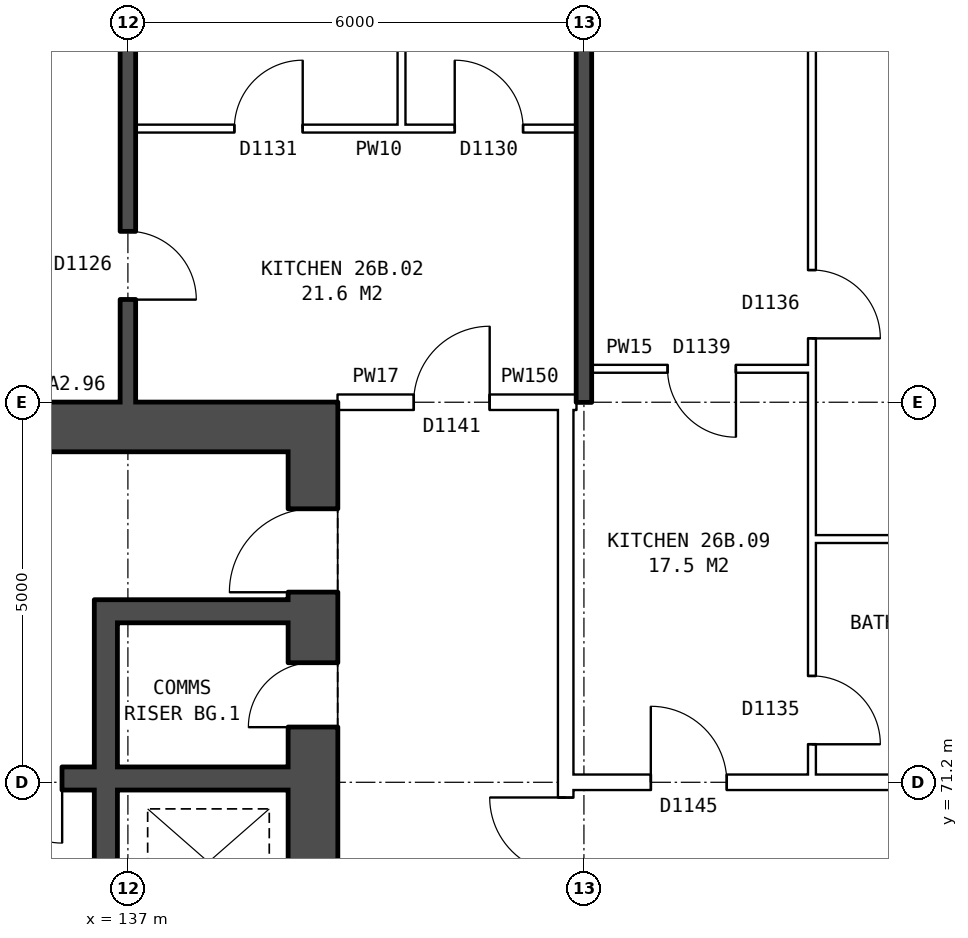
"""IFC4 building model, lengths in metres.
Left out: names, types, materials, properties, quantities, classifications, styles, units other than length and angle.
Written with IfcOpenShell. Run it as: python <this file> out.ifc"""

import sys

from ifc_helpers import new_model, si_unit, direction, frame, frame_2d, origin, place, context, subcontext, project, spatial, rectangle, extrude, element, fill, save


model = new_model("IFC4")
c1 = context("Model", 3, precision=1e-05, world=origin(), true_north=direction((0.0, 1.0)))
c2 = subcontext(c1, "Body", "Model", "MODEL_VIEW")
j1 = project(units=[si_unit("LENGTHUNIT", "METRE"), si_unit("PLANEANGLEUNIT", "RADIAN")], contexts=[c1])
p1 = place(None, origin())
s1 = spatial("IfcSite", under=j1, at=p1, CompositionType="ELEMENT")
p2 = place(p1, origin())
s2 = spatial("IfcBuilding", under=s1, at=p2, CompositionType="ELEMENT")
p3 = place(p2, frame((0.0, 0.0, 96.4)))
s3 = spatial("IfcBuildingStorey", under=s2, at=p3, CompositionType="ELEMENT", Elevation=96.4)
p4 = place(p3, frame((139.435, 64.45, 0.0), z_axis=(0.0, 0.0, 1.0), x_axis=(0.0, 1.0, 0.0)))
e1 = element("IfcWall", 1, at=p4, inside=s3, PredefinedType="SHEAR", context=c2, shape_type="SweptSolid", body=[
    extrude(rectangle(XDim=11.1, YDim=0.65, at=frame_2d((5.55, 0.0))), origin(), (0.0, 0.0, 1.0), 2.85),
])
p5 = place(p4, frame((0.675, 0.0, 0.0)))
e2 = element("IfcOpeningElement", 2, at=p5, cuts=e1, PredefinedType="OPENING", context=c2, shape_type="SweptSolid", body=[
    extrude(rectangle(XDim=1.1, YDim=2.1, at=frame_2d((0.55, 1.05))), frame((0.0, 0.335, 0.0), z_axis=(0.0, -1.0, 0.0), x_axis=(1.0, 0.0, 0.0)), (0.0, 0.0, 1.0), 0.67),
])
p6 = place(p4, frame((9.25, 0.0, 0.0)))
e3 = element("IfcOpeningElement", 3, at=p6, cuts=e1, PredefinedType="OPENING", context=c2, shape_type="SweptSolid", body=[
    extrude(rectangle(XDim=1.1, YDim=2.1, at=frame_2d((0.55, 1.05))), frame((0.0, 0.335, 0.0), z_axis=(0.0, -1.0, 0.0), x_axis=(1.0, 0.0, 0.0)), (0.0, 0.0, 1.0), 0.67),
])
p7 = place(p4, frame((7.475, 0.0, 0.0)))
e4 = element("IfcOpeningElement", 4, at=p7, cuts=e1, PredefinedType="OPENING", context=c2, shape_type="SweptSolid", body=[
    extrude(rectangle(XDim=0.85, YDim=2.1, at=frame_2d((0.425, 1.05))), frame((0.0, 0.335, 0.0), z_axis=(0.0, -1.0, 0.0), x_axis=(1.0, 0.0, 0.0)), (0.0, 0.0, 1.0), 0.67),
])
p8 = place(p3, frame((139.76, 75.875, 0.0), z_axis=(0.0, 0.0, 1.0), x_axis=(-1.0, 0.0, 0.0)))
e5 = element("IfcWall", 5, at=p8, inside=s3, PredefinedType="SHEAR", context=c2, shape_type="SweptSolid", body=[
    extrude(rectangle(XDim=8.4, YDim=0.65, at=frame_2d((4.2, 0.0))), origin(), (0.0, 0.0, 1.0), 2.85),
])
p9 = place(p3, frame((139.11, 71.25, 0.0), z_axis=(0.0, 0.0, 1.0), x_axis=(-1.0, 0.0, 0.0)))
e6 = element("IfcWall", 6, at=p9, inside=s3, PredefinedType="SHEAR", context=c2, shape_type="SweptSolid", body=[
    extrude(rectangle(XDim=7.1, YDim=0.3, at=frame_2d((3.55, 0.0))), origin(), (0.0, 0.0, 1.0), 2.85),
])
p10 = place(p9, frame((4.7, 0.0, 0.0)))
e7 = element("IfcOpeningElement", 7, at=p10, cuts=e6, PredefinedType="OPENING", context=c2, shape_type="SweptSolid", body=[
    extrude(rectangle(XDim=1.1, YDim=2.1, at=frame_2d((0.55, 1.05))), frame((0.0, 0.16, 0.0), z_axis=(0.0, -1.0, 0.0), x_axis=(1.0, 0.0, 0.0)), (0.0, 0.0, 1.0), 0.32),
])
p11 = place(p9, frame((2.975, 0.0, 0.0)))
e8 = element("IfcOpeningElement", 8, at=p11, cuts=e6, PredefinedType="OPENING", context=c2, shape_type="SweptSolid", body=[
    extrude(rectangle(XDim=0.85, YDim=2.1, at=frame_2d((0.425, 1.05))), frame((0.0, 0.16, 0.0), z_axis=(0.0, -1.0, 0.0), x_axis=(1.0, 0.0, 0.0)), (0.0, 0.0, 1.0), 0.32),
])
p12 = place(p3, frame((139.11, 73.45, 0.0), z_axis=(0.0, 0.0, 1.0), x_axis=(-1.0, 0.0, 0.0)))
e9 = element("IfcWall", 9, at=p12, inside=s3, PredefinedType="SHEAR", context=c2, shape_type="SweptSolid", body=[
    extrude(rectangle(XDim=2.25, YDim=0.3, at=frame_2d((1.125, 0.0))), origin(), (0.0, 0.0, 1.0), 2.85),
])
p13 = place(p3, frame((136.71, 67.0, 0.0), z_axis=(0.0, 0.0, 1.0), x_axis=(0.0, 1.0, 0.0)))
e10 = element("IfcWall", 10, at=p13, inside=s3, PredefinedType="SHEAR", context=c2, shape_type="SweptSolid", body=[
    extrude(rectangle(XDim=4.1, YDim=0.3, at=frame_2d((2.05, 0.0))), origin(), (0.0, 0.0, 1.0), 2.85),
])
p14 = place(p3, frame((136.71, 71.4, 0.0), z_axis=(0.0, 0.0, 1.0), x_axis=(0.0, 1.0, 0.0)))
e11 = element("IfcWall", 11, at=p14, inside=s3, PredefinedType="SHEAR", context=c2, shape_type="SweptSolid", body=[
    extrude(rectangle(XDim=2.2, YDim=0.3, at=frame_2d((1.1, 0.0))), origin(), (0.0, 0.0, 1.0), 2.85),
])
p15 = place(p3, frame((142.76, 63.9, 0.0), z_axis=(0.0, 0.0, 1.0), x_axis=(0.0, 1.0, 0.0)))
e12 = element("IfcWall", 12, at=p15, inside=s3, PredefinedType="PARTITIONING", context=c2, shape_type="SweptSolid", body=[
    extrude(rectangle(XDim=12.2, YDim=0.2, at=frame_2d((6.1, 0.0))), origin(), (0.0, 0.0, 1.0), 2.85),
])
p16 = place(p15, frame((5.1, 0.0, 0.0)))
e13 = element("IfcOpeningElement", 13, at=p16, cuts=e12, PredefinedType="OPENING", context=c2, shape_type="SweptSolid", body=[
    extrude(rectangle(XDim=2.0, YDim=2.1, at=frame_2d((1.0, 1.05))), frame((0.0, 0.11, 0.0), z_axis=(0.0, -1.0, 0.0), x_axis=(1.0, 0.0, 0.0)), (0.0, 0.0, 1.0), 0.22),
])
p17 = place(p3, frame((142.76, 71.2, 0.0), z_axis=(0.0, 0.0, 1.0), x_axis=(1.0, 0.0, 0.0)))
e14 = element("IfcWall", 14, at=p17, inside=s3, PredefinedType="PARTITIONING", context=c2, shape_type="SweptSolid", body=[
    extrude(rectangle(XDim=14.48, YDim=0.2, at=frame_2d((7.24, 0.0))), origin(), (0.0, 0.0, 1.0), 2.85),
])
p18 = place(p17, frame((1.12, 0.0, 0.0)))
e15 = element("IfcOpeningElement", 15, at=p18, cuts=e14, PredefinedType="OPENING", context=c2, shape_type="SweptSolid", body=[
    extrude(rectangle(XDim=1.0, YDim=2.1, at=frame_2d((0.5, 1.05))), frame((0.0, 0.11, 0.0), z_axis=(0.0, -1.0, 0.0), x_axis=(1.0, 0.0, 0.0)), (0.0, 0.0, 1.0), 0.22),
])
p19 = place(p17, frame((10.24, 0.0, 0.0)))
e16 = element("IfcOpeningElement", 16, at=p19, cuts=e14, PredefinedType="OPENING", context=c2, shape_type="SweptSolid", body=[
    extrude(rectangle(XDim=1.0, YDim=2.1, at=frame_2d((0.5, 1.05))), frame((0.0, 0.11, 0.0), z_axis=(0.0, -1.0, 0.0), x_axis=(1.0, 0.0, 0.0)), (0.0, 0.0, 1.0), 0.22),
])
p20 = place(p3, frame((146.0, 74.4, 0.0), z_axis=(0.0, 0.0, 1.0), x_axis=(1.0, 0.0, 0.0)))
e17 = element("IfcWall", 17, at=p20, inside=s3, PredefinedType="PARTITIONING", context=c2, shape_type="SweptSolid", body=[
    extrude(rectangle(XDim=6.0, YDim=0.1, at=frame_2d((3.0, 0.0))), origin(), (0.0, 0.0, 1.0), 2.85),
])
p21 = place(p3, frame((139.76, 76.2, 0.0), z_axis=(0.0, 0.0, 1.0), x_axis=(1.0, 0.0, 0.0)))
e18 = element("IfcWall", 18, at=p21, inside=s3, PredefinedType="PARTITIONING", context=c2, shape_type="SweptSolid", body=[
    extrude(rectangle(XDim=3.0, YDim=0.2, at=frame_2d((1.5, 0.0))), origin(), (0.0, 0.0, 1.0), 2.85),
])
p22 = place(p21, frame((1.0, 0.0, 0.0)))
e19 = element("IfcOpeningElement", 19, at=p22, cuts=e18, PredefinedType="OPENING", context=c2, shape_type="SweptSolid", body=[
    extrude(rectangle(XDim=1.0, YDim=2.1, at=frame_2d((0.5, 1.05))), frame((0.0, 0.11, 0.0), z_axis=(0.0, -1.0, 0.0), x_axis=(1.0, 0.0, 0.0)), (0.0, 0.0, 1.0), 0.22),
])
p23 = place(p3, frame((142.76, 76.2, 0.0), z_axis=(0.0, 0.0, 1.0), x_axis=(1.0, 0.0, 0.0)))
e20 = element("IfcWall", 20, at=p23, inside=s3, PredefinedType="PARTITIONING", context=c2, shape_type="SweptSolid", body=[
    extrude(rectangle(XDim=0.14, YDim=0.2, at=frame_2d((0.07, 0.0))), origin(), (0.0, 0.0, 1.0), 2.85),
])
p24 = place(p3, frame((143.1, 76.64, 0.0), z_axis=(0.0, 0.0, 1.0), x_axis=(1.0, 0.0, 0.0)))
e21 = element("IfcWall", 21, at=p24, inside=s3, PredefinedType="PARTITIONING", context=c2, shape_type="SweptSolid", body=[
    extrude(rectangle(XDim=2.9, YDim=0.1, at=frame_2d((1.45, 0.0))), origin(), (0.0, 0.0, 1.0), 2.85),
])
p25 = place(p24, frame((1.0, 0.0, 0.0)))
e22 = element("IfcOpeningElement", 22, at=p25, cuts=e21, PredefinedType="OPENING", context=c2, shape_type="SweptSolid", body=[
    extrude(rectangle(XDim=0.9, YDim=2.1, at=frame_2d((0.45, 1.05))), frame((0.0, 0.06, 0.0), z_axis=(0.0, -1.0, 0.0), x_axis=(1.0, 0.0, 0.0)), (0.0, 0.0, 1.0), 0.12),
])
p26 = place(p3, frame((137.1, 79.8, 0.0), z_axis=(0.0, 0.0, 1.0), x_axis=(1.0, 0.0, 0.0)))
e23 = element("IfcWall", 23, at=p26, inside=s3, PredefinedType="PARTITIONING", context=c2, shape_type="SweptSolid", body=[
    extrude(rectangle(XDim=5.8, YDim=0.1, at=frame_2d((2.9, 0.0))), origin(), (0.0, 0.0, 1.0), 2.85),
])
p27 = place(p26, frame((1.3, 0.0, 0.0)))
e24 = element("IfcOpeningElement", 24, at=p27, cuts=e23, PredefinedType="OPENING", context=c2, shape_type="SweptSolid", body=[
    extrude(rectangle(XDim=0.9, YDim=2.1, at=frame_2d((0.45, 1.05))), frame((0.0, 0.06, 0.0), z_axis=(0.0, -1.0, 0.0), x_axis=(1.0, 0.0, 0.0)), (0.0, 0.0, 1.0), 0.12),
])
p28 = place(p26, frame((4.2, 0.0, 0.0)))
e25 = element("IfcOpeningElement", 25, at=p28, cuts=e23, PredefinedType="OPENING", context=c2, shape_type="SweptSolid", body=[
    extrude(rectangle(XDim=0.9, YDim=2.1, at=frame_2d((0.45, 1.05))), frame((0.0, 0.06, 0.0), z_axis=(0.0, -1.0, 0.0), x_axis=(1.0, 0.0, 0.0)), (0.0, 0.0, 1.0), 0.12),
])
p29 = place(p3, frame((137.0, 76.2, 0.0), z_axis=(0.0, 0.0, 1.0), x_axis=(0.0, 1.0, 0.0)))
e26 = element("IfcWall", 26, at=p29, inside=s3, PredefinedType="SOLIDWALL", context=c2, shape_type="SweptSolid", body=[
    extrude(rectangle(XDim=9.44, YDim=0.2, at=frame_2d((4.72, 0.0))), origin(), (0.0, 0.0, 1.0), 2.85),
])
p30 = place(p29, frame((1.35, 0.0, 0.0)))
e27 = element("IfcOpeningElement", 27, at=p30, cuts=e26, PredefinedType="OPENING", context=c2, shape_type="SweptSolid", body=[
    extrude(rectangle(XDim=0.9, YDim=2.1, at=frame_2d((0.45, 1.05))), frame((0.0, 0.11, 0.0), z_axis=(0.0, -1.0, 0.0), x_axis=(1.0, 0.0, 0.0)), (0.0, 0.0, 1.0), 0.22),
])
p31 = place(p3, frame((140.6, 79.85, 0.0), z_axis=(0.0, 0.0, 1.0), x_axis=(0.0, 1.0, 0.0)))
e28 = element("IfcWall", 28, at=p31, inside=s3, PredefinedType="PARTITIONING", context=c2, shape_type="SweptSolid", body=[
    extrude(rectangle(XDim=2.3, YDim=0.1, at=frame_2d((1.15, 0.0))), origin(), (0.0, 0.0, 1.0), 2.85),
])
p32 = place(p3, frame((143.0, 76.2, 0.0), z_axis=(0.0, 0.0, 1.0), x_axis=(0.0, 1.0, 0.0)))
e29 = element("IfcWall", 29, at=p32, inside=s3, PredefinedType="SOLIDWALL", context=c2, shape_type="SweptSolid", body=[
    extrude(rectangle(XDim=9.44, YDim=0.2, at=frame_2d((4.72, 0.0))), origin(), (0.0, 0.0, 1.0), 2.85),
])
p33 = place(p3, frame((146.0, 71.3, 0.0), z_axis=(0.0, 0.0, 1.0), x_axis=(0.0, 1.0, 0.0)))
e30 = element("IfcWall", 30, at=p33, inside=s3, PredefinedType="PARTITIONING", context=c2, shape_type="SweptSolid", body=[
    extrude(rectangle(XDim=14.34, YDim=0.1, at=frame_2d((7.17, 0.0))), origin(), (0.0, 0.0, 1.0), 2.85),
])
p34 = place(p33, frame((5.74, 0.0, 0.0)))
e31 = element("IfcOpeningElement", 31, at=p34, cuts=e30, PredefinedType="OPENING", context=c2, shape_type="SweptSolid", body=[
    extrude(rectangle(XDim=0.9, YDim=2.1, at=frame_2d((0.45, 1.05))), frame((0.0, 0.06, 0.0), z_axis=(0.0, -1.0, 0.0), x_axis=(1.0, 0.0, 0.0)), (0.0, 0.0, 1.0), 0.12),
])
p35 = place(p33, frame((0.4, 0.0, 0.0)))
e32 = element("IfcOpeningElement", 32, at=p35, cuts=e30, PredefinedType="OPENING", context=c2, shape_type="SweptSolid", body=[
    extrude(rectangle(XDim=0.9, YDim=2.1, at=frame_2d((0.45, 1.05))), frame((0.0, 0.06, 0.0), z_axis=(0.0, -1.0, 0.0), x_axis=(1.0, 0.0, 0.0)), (0.0, 0.0, 1.0), 0.12),
])
p36 = place(p6, origin())
e33 = element("IfcDoor", 33, at=p36, inside=s3, OperationType="SINGLE_SWING_LEFT", PredefinedType="DOOR", context=c2, shape_type="SweptSolid", body=[
    extrude(rectangle(XDim=1.1, YDim=2.1, at=frame_2d((0.55, 1.05))), frame((0.0, 0.31, 0.0), z_axis=(0.0, -1.0, 0.0), x_axis=(1.0, 0.0, 0.0)), (0.0, 0.0, 1.0), 0.05),
])
fill(e3, e33)
p37 = place(p7, origin())
e34 = element("IfcDoor", 34, at=p37, inside=s3, OperationType="SINGLE_SWING_LEFT", PredefinedType="DOOR", context=c2, shape_type="SweptSolid", body=[
    extrude(rectangle(XDim=0.85, YDim=2.1, at=frame_2d((0.425, 1.05))), frame((0.0, 0.31, 0.0), z_axis=(0.0, -1.0, 0.0), x_axis=(1.0, 0.0, 0.0)), (0.0, 0.0, 1.0), 0.05),
])
fill(e4, e34)
p38 = place(p11, origin())
e35 = element("IfcDoor", 35, at=p38, inside=s3, OperationType="SINGLE_SWING_LEFT", PredefinedType="DOOR", context=c2, shape_type="SweptSolid", body=[
    extrude(rectangle(XDim=0.85, YDim=2.1, at=frame_2d((0.425, 1.05))), frame((0.0, 0.025, 0.0), z_axis=(0.0, -1.0, 0.0), x_axis=(1.0, 0.0, 0.0)), (0.0, 0.0, 1.0), 0.05),
])
fill(e8, e35)
p39 = place(p16, origin())
e36 = element("IfcDoor", 36, at=p39, inside=s3, OperationType="DOUBLE_DOOR_SINGLE_SWING", PredefinedType="DOOR", context=c2, shape_type="SweptSolid", body=[
    extrude(rectangle(XDim=2.0, YDim=2.1, at=frame_2d((1.0, 1.05))), frame((0.0, 0.025, 0.0), z_axis=(0.0, -1.0, 0.0), x_axis=(1.0, 0.0, 0.0)), (0.0, 0.0, 1.0), 0.05),
])
fill(e13, e36)
p40 = place(p27, origin())
e37 = element("IfcDoor", 37, at=p40, inside=s3, OperationType="SINGLE_SWING_RIGHT", PredefinedType="DOOR", context=c2, shape_type="SweptSolid", body=[
    extrude(rectangle(XDim=0.9, YDim=2.1, at=frame_2d((0.45, 1.05))), frame((0.0, 0.025, 0.0), z_axis=(0.0, -1.0, 0.0), x_axis=(1.0, 0.0, 0.0)), (0.0, 0.0, 1.0), 0.05),
])
fill(e24, e37)
p41 = place(p22, origin())
e38 = element("IfcDoor", 38, at=p41, inside=s3, OperationType="SINGLE_SWING_RIGHT", PredefinedType="DOOR", context=c2, shape_type="SweptSolid", body=[
    extrude(rectangle(XDim=1.0, YDim=2.1, at=frame_2d((0.5, 1.05))), frame((0.0, 0.025, 0.0), z_axis=(0.0, -1.0, 0.0), x_axis=(1.0, 0.0, 0.0)), (0.0, 0.0, 1.0), 0.05),
])
fill(e19, e38)
p42 = place(p30, frame((0.9, 0.0, 0.0), z_axis=(0.0, 0.0, 1.0), x_axis=(-1.0, 0.0, 0.0)))
e39 = element("IfcDoor", 39, at=p42, inside=s3, OperationType="SINGLE_SWING_RIGHT", PredefinedType="DOOR", context=c2, shape_type="SweptSolid", body=[
    extrude(rectangle(XDim=0.9, YDim=2.1, at=frame_2d((0.45, 1.05))), frame((0.0, 0.025, 0.0), z_axis=(0.0, -1.0, 0.0), x_axis=(1.0, 0.0, 0.0)), (0.0, 0.0, 1.0), 0.05),
])
fill(e27, e39)
p43 = place(p28, origin())
e40 = element("IfcDoor", 40, at=p43, inside=s3, OperationType="SINGLE_SWING_LEFT", PredefinedType="DOOR", context=c2, shape_type="SweptSolid", body=[
    extrude(rectangle(XDim=0.9, YDim=2.1, at=frame_2d((0.45, 1.05))), frame((0.0, 0.025, 0.0), z_axis=(0.0, -1.0, 0.0), x_axis=(1.0, 0.0, 0.0)), (0.0, 0.0, 1.0), 0.05),
])
fill(e25, e40)
p44 = place(p34, frame((0.9, 0.0, 0.0), z_axis=(0.0, 0.0, 1.0), x_axis=(-1.0, 0.0, 0.0)))
e41 = element("IfcDoor", 41, at=p44, inside=s3, OperationType="SINGLE_SWING_RIGHT", PredefinedType="DOOR", context=c2, shape_type="SweptSolid", body=[
    extrude(rectangle(XDim=0.9, YDim=2.1, at=frame_2d((0.45, 1.05))), frame((0.0, 0.025, 0.0), z_axis=(0.0, -1.0, 0.0), x_axis=(1.0, 0.0, 0.0)), (0.0, 0.0, 1.0), 0.05),
])
fill(e31, e41)
p45 = place(p18, origin())
e42 = element("IfcDoor", 42, at=p45, inside=s3, OperationType="SINGLE_SWING_LEFT", PredefinedType="DOOR", context=c2, shape_type="SweptSolid", body=[
    extrude(rectangle(XDim=1.0, YDim=2.1, at=frame_2d((0.5, 1.05))), frame((0.0, 0.025, 0.0), z_axis=(0.0, -1.0, 0.0), x_axis=(1.0, 0.0, 0.0)), (0.0, 0.0, 1.0), 0.05),
])
fill(e15, e42)
p46 = place(p25, frame((0.9, 0.0, 0.0), z_axis=(0.0, 0.0, 1.0), x_axis=(-1.0, 0.0, 0.0)))
e43 = element("IfcDoor", 43, at=p46, inside=s3, OperationType="SINGLE_SWING_LEFT", PredefinedType="DOOR", context=c2, shape_type="SweptSolid", body=[
    extrude(rectangle(XDim=0.9, YDim=2.1, at=frame_2d((0.45, 1.05))), frame((0.0, 0.025, 0.0), z_axis=(0.0, -1.0, 0.0), x_axis=(1.0, 0.0, 0.0)), (0.0, 0.0, 1.0), 0.05),
])
fill(e22, e43)
p47 = place(p35, frame((0.9, 0.0, 0.0), z_axis=(0.0, 0.0, 1.0), x_axis=(-1.0, 0.0, 0.0)))
e44 = element("IfcDoor", 44, at=p47, inside=s3, OperationType="SINGLE_SWING_RIGHT", PredefinedType="DOOR", context=c2, shape_type="SweptSolid", body=[
    extrude(rectangle(XDim=0.9, YDim=2.1, at=frame_2d((0.45, 1.05))), frame((0.0, 0.025, 0.0), z_axis=(0.0, -1.0, 0.0), x_axis=(1.0, 0.0, 0.0)), (0.0, 0.0, 1.0), 0.05),
])
fill(e32, e44)
save(model, sys.argv[1])
